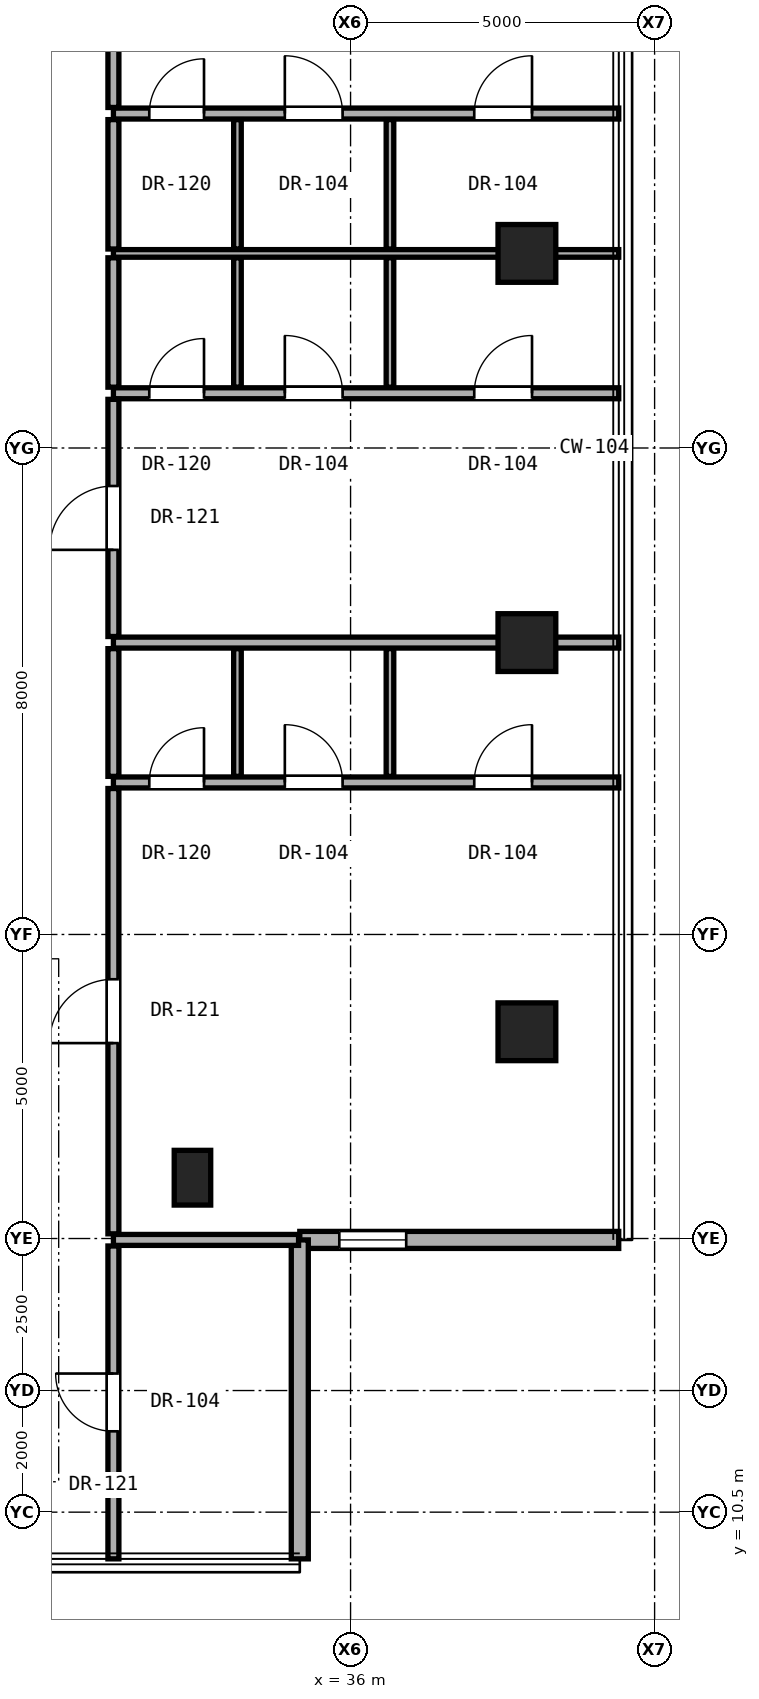
"""IFC4 building model, lengths in metres.
Left out: names, types, materials, properties, quantities, classifications, styles, units other than length and angle.
Written with IfcOpenShell. Run it as: python <this file> out.ifc"""

import sys

from ifc_helpers import new_model, si_unit, direction, frame, frame_2d, origin, origin_2d, place, context, subcontext, project, spatial, rectangle, hollow_rectangle, extrude, element, fill, save


model = new_model("IFC4")
c1 = context("Model", 3, precision=1e-05, world=origin(), true_north=direction((0.0, 1.0)))
c2 = subcontext(c1, "Body", "Model", "MODEL_VIEW")
j1 = project(units=[si_unit("LENGTHUNIT", "METRE"), si_unit("PLANEANGLEUNIT", "RADIAN")], contexts=[c1])
p1 = place(None, origin())
s1 = spatial("IfcSite", under=j1, at=p1, CompositionType="ELEMENT")
p2 = place(p1, origin())
s2 = spatial("IfcBuilding", under=s1, at=p2, CompositionType="ELEMENT")
p3 = place(p2, frame((0.0, 0.0, 157.65)))
s3 = spatial("IfcBuildingStorey", under=s2, at=p3, CompositionType="ELEMENT", Elevation=157.65)
for number, where, z_axis, x_axis in (
    (1, (38.9, 18.4, 0.0), (0.0, 0.0, 1.0), (1.0, 0.0, 0.0)),
    (2, (38.9, 24.8, 0.0), (0.0, 0.0, 1.0), (1.0, 0.0, 0.0)),
    (3, (38.9, 31.2, 0.0), (0.0, 0.0, 1.0), (1.0, 0.0, 0.0)),
):
    element("IfcColumn", number, at=place(p3, frame(where, z_axis=z_axis, x_axis=x_axis)), inside=s3, PredefinedType="COLUMN", context=c2, shape_type="SweptSolid", body=[
        extrude(hollow_rectangle(XDim=0.95, YDim=0.95, WallThickness=0.05, at=origin_2d()), origin(), (0.0, 0.0, 1.0), 3.25),
    ])
p4 = place(p3, frame((33.4, 16.0, 0.0), z_axis=(0.0, 0.0, 1.0), x_axis=(1.0, 0.0, 0.0)))
e4 = element("IfcColumn", 4, at=p4, inside=s3, PredefinedType="PILASTER", context=c2, shape_type="SweptSolid", body=[
    extrude(rectangle(XDim=0.6, YDim=0.9, at=origin_2d()), origin(), (0.0, 0.0, 1.0), 3.25),
])
p5 = place(p3, frame((35.165, 14.977, 0.0), z_axis=(0.0, 0.0, 1.0), x_axis=(1.0, 0.0, 0.0)))
e5 = element("IfcWall", 5, at=p5, inside=s3, PredefinedType="SOLIDWALL", context=c2, shape_type="SweptSolid", body=[
    extrude(rectangle(XDim=5.245, YDim=0.28, at=frame_2d((2.623, 0.0))), origin(), (0.0, 0.0, 1.0), 3.03),
])
p6 = place(p5, frame((0.65, 0.0, 0.85)))
e6 = element("IfcOpeningElement", 6, at=p6, cuts=e5, PredefinedType="OPENING", context=c2, shape_type="SweptSolid", body=[
    extrude(rectangle(XDim=1.1, YDim=2.0, at=frame_2d((0.55, 1.0))), frame((0.0, 0.15, 0.0), z_axis=(0.0, -1.0, 0.0), x_axis=(1.0, 0.0, 0.0)), (0.0, 0.0, 1.0), 0.3),
])
p7 = place(p3, frame((35.165, 9.732, 0.0), z_axis=(0.0, 0.0, 1.0), x_axis=(0.0, 1.0, 0.0)))
e7 = element("IfcWall", 7, at=p7, inside=s3, PredefinedType="SOLIDWALL", context=c2, shape_type="SweptSolid", body=[
    extrude(rectangle(XDim=5.245, YDim=0.28, at=frame_2d((2.623, 0.0))), origin(), (0.0, 0.0, 1.0), 3.03),
])
p8 = place(p3, frame((32.1, 14.977, 0.0), z_axis=(0.0, 0.0, 1.0), x_axis=(1.0, 0.0, 0.0)))
e8 = element("IfcWall", 8, at=p8, inside=s3, PredefinedType="PARTITIONING", context=c2, shape_type="SweptSolid", body=[
    extrude(rectangle(XDim=3.045, YDim=0.18, at=frame_2d((1.522, 0.0))), origin(), (0.0, 0.0, 1.0), 3.05),
])
p9 = place(p3, frame((32.1, 22.5, 0.0), z_axis=(0.0, 0.0, 1.0), x_axis=(1.0, 0.0, 0.0)))
e9 = element("IfcWall", 9, at=p9, inside=s3, PredefinedType="PARTITIONING", context=c2, shape_type="SweptSolid", body=[
    extrude(rectangle(XDim=8.31, YDim=0.18, at=frame_2d((4.155, 0.0))), origin(), (0.0, 0.0, 1.0), 2.269),
])
p10 = place(p9, frame((5.934, 0.0, 0.0)))
e10 = element("IfcOpeningElement", 10, at=p10, cuts=e9, PredefinedType="OPENING", context=c2, shape_type="SweptSolid", body=[
    extrude(rectangle(XDim=0.95, YDim=2.15, at=frame_2d((0.475, 1.075))), frame((0.0, 0.1, 0.0), z_axis=(0.0, -1.0, 0.0), x_axis=(1.0, 0.0, 0.0)), (0.0, 0.0, 1.0), 0.2),
])
p11 = place(p9, frame((2.819, 0.0, 0.0)))
e11 = element("IfcOpeningElement", 11, at=p11, cuts=e9, PredefinedType="OPENING", context=c2, shape_type="SweptSolid", body=[
    extrude(rectangle(XDim=0.95, YDim=2.15, at=frame_2d((0.475, 1.075))), frame((0.0, 0.1, 0.0), z_axis=(0.0, -1.0, 0.0), x_axis=(1.0, 0.0, 0.0)), (0.0, 0.0, 1.0), 0.2),
])
p12 = place(p9, frame((0.59, 0.0, 0.0)))
e12 = element("IfcOpeningElement", 12, at=p12, cuts=e9, PredefinedType="OPENING", context=c2, shape_type="SweptSolid", body=[
    extrude(rectangle(XDim=0.9, YDim=2.1, at=frame_2d((0.45, 1.05))), frame((0.0, 0.1, 0.0), z_axis=(0.0, -1.0, 0.0), x_axis=(1.0, 0.0, 0.0)), (0.0, 0.0, 1.0), 0.2),
])
p13 = place(p3, frame((32.1, 24.8, 0.0), z_axis=(0.0, 0.0, 1.0), x_axis=(1.0, 0.0, 0.0)))
e13 = element("IfcWall", 13, at=p13, inside=s3, PredefinedType="PARTITIONING", context=c2, shape_type="SweptSolid", body=[
    extrude(rectangle(XDim=8.31, YDim=0.18, at=frame_2d((4.155, 0.0))), origin(), (0.0, 0.0, 1.0), 2.269),
])
p14 = place(p3, frame((32.1, 28.9, 0.0), z_axis=(0.0, 0.0, 1.0), x_axis=(1.0, 0.0, 0.0)))
e14 = element("IfcWall", 14, at=p14, inside=s3, PredefinedType="PARTITIONING", context=c2, shape_type="SweptSolid", body=[
    extrude(rectangle(XDim=8.31, YDim=0.18, at=frame_2d((4.155, 0.0))), origin(), (0.0, 0.0, 1.0), 2.269),
])
p15 = place(p14, frame((5.934, 0.0, 0.0)))
e15 = element("IfcOpeningElement", 15, at=p15, cuts=e14, PredefinedType="OPENING", context=c2, shape_type="SweptSolid", body=[
    extrude(rectangle(XDim=0.95, YDim=2.15, at=frame_2d((0.475, 1.075))), frame((0.0, 0.1, 0.0), z_axis=(0.0, -1.0, 0.0), x_axis=(1.0, 0.0, 0.0)), (0.0, 0.0, 1.0), 0.2),
])
p16 = place(p14, frame((2.819, 0.0, 0.0)))
e16 = element("IfcOpeningElement", 16, at=p16, cuts=e14, PredefinedType="OPENING", context=c2, shape_type="SweptSolid", body=[
    extrude(rectangle(XDim=0.95, YDim=2.15, at=frame_2d((0.475, 1.075))), frame((0.0, 0.1, 0.0), z_axis=(0.0, -1.0, 0.0), x_axis=(1.0, 0.0, 0.0)), (0.0, 0.0, 1.0), 0.2),
])
p17 = place(p14, frame((0.59, 0.0, 0.0)))
e17 = element("IfcOpeningElement", 17, at=p17, cuts=e14, PredefinedType="OPENING", context=c2, shape_type="SweptSolid", body=[
    extrude(rectangle(XDim=0.9, YDim=2.1, at=frame_2d((0.45, 1.05))), frame((0.0, 0.1, 0.0), z_axis=(0.0, -1.0, 0.0), x_axis=(1.0, 0.0, 0.0)), (0.0, 0.0, 1.0), 0.2),
])
p18 = place(p3, frame((32.1, 31.2, 0.0), z_axis=(0.0, 0.0, 1.0), x_axis=(1.0, 0.0, 0.0)))
e18 = element("IfcWall", 18, at=p18, inside=s3, PredefinedType="PARTITIONING", context=c2, shape_type="SweptSolid", body=[
    extrude(rectangle(XDim=8.31, YDim=0.125, at=frame_2d((4.155, 0.0))), origin(), (0.0, 0.0, 1.0), 2.269),
])
p19 = place(p3, frame((32.1, 33.5, 0.0), z_axis=(0.0, 0.0, 1.0), x_axis=(1.0, 0.0, 0.0)))
e19 = element("IfcWall", 19, at=p19, inside=s3, PredefinedType="PARTITIONING", context=c2, shape_type="SweptSolid", body=[
    extrude(rectangle(XDim=8.31, YDim=0.18, at=frame_2d((4.155, 0.0))), origin(), (0.0, 0.0, 1.0), 2.269),
])
p20 = place(p19, frame((5.934, 0.0, 0.0)))
e20 = element("IfcOpeningElement", 20, at=p20, cuts=e19, PredefinedType="OPENING", context=c2, shape_type="SweptSolid", body=[
    extrude(rectangle(XDim=0.95, YDim=2.15, at=frame_2d((0.475, 1.075))), frame((0.0, 0.1, 0.0), z_axis=(0.0, -1.0, 0.0), x_axis=(1.0, 0.0, 0.0)), (0.0, 0.0, 1.0), 0.2),
])
p21 = place(p19, frame((2.819, 0.0, 0.0)))
e21 = element("IfcOpeningElement", 21, at=p21, cuts=e19, PredefinedType="OPENING", context=c2, shape_type="SweptSolid", body=[
    extrude(rectangle(XDim=0.95, YDim=2.15, at=frame_2d((0.475, 1.075))), frame((0.0, 0.1, 0.0), z_axis=(0.0, -1.0, 0.0), x_axis=(1.0, 0.0, 0.0)), (0.0, 0.0, 1.0), 0.2),
])
p22 = place(p19, frame((0.59, 0.0, 0.0)))
e22 = element("IfcOpeningElement", 22, at=p22, cuts=e19, PredefinedType="OPENING", context=c2, shape_type="SweptSolid", body=[
    extrude(rectangle(XDim=0.9, YDim=2.1, at=frame_2d((0.45, 1.05))), frame((0.0, 0.1, 0.0), z_axis=(0.0, -1.0, 0.0), x_axis=(1.0, 0.0, 0.0)), (0.0, 0.0, 1.0), 0.2),
])
p23 = place(p3, frame((32.1, 9.732, 0.0), z_axis=(0.0, 0.0, 1.0), x_axis=(0.0, 1.0, 0.0)))
e23 = element("IfcWall", 23, at=p23, inside=s3, PredefinedType="PARTITIONING", context=c2, shape_type="SweptSolid", body=[
    extrude(rectangle(XDim=5.145, YDim=0.18, at=frame_2d((2.573, 0.0))), origin(), (0.0, 0.0, 1.0), 3.05),
])
p24 = place(p23, frame((2.097, 0.0, 0.0)))
e24 = element("IfcOpeningElement", 24, at=p24, cuts=e23, PredefinedType="OPENING", context=c2, shape_type="SweptSolid", body=[
    extrude(rectangle(XDim=0.95, YDim=2.15, at=frame_2d((0.475, 1.075))), frame((0.0, 0.1, 0.0), z_axis=(0.0, -1.0, 0.0), x_axis=(1.0, 0.0, 0.0)), (0.0, 0.0, 1.0), 0.2),
])
p25 = place(p3, frame((32.1, 15.077, 0.0), z_axis=(0.0, 0.0, 1.0), x_axis=(0.0, 1.0, 0.0)))
e25 = element("IfcWall", 25, at=p25, inside=s3, PredefinedType="PARTITIONING", context=c2, shape_type="SweptSolid", body=[
    extrude(rectangle(XDim=7.323, YDim=0.18, at=frame_2d((3.662, 0.0))), origin(), (0.0, 0.0, 1.0), 2.442),
])
p26 = place(p25, frame((3.136, 0.0, 0.0)))
e26 = element("IfcOpeningElement", 26, at=p26, cuts=e25, PredefinedType="OPENING", context=c2, shape_type="SweptSolid", body=[
    extrude(rectangle(XDim=1.05, YDim=2.2, at=frame_2d((0.525, 1.1))), frame((0.0, 0.1, 0.0), z_axis=(0.0, -1.0, 0.0), x_axis=(1.0, 0.0, 0.0)), (0.0, 0.0, 1.0), 0.2),
])
p27 = place(p3, frame((32.1, 22.6, 0.0), z_axis=(0.0, 0.0, 1.0), x_axis=(0.0, 1.0, 0.0)))
e27 = element("IfcWall", 27, at=p27, inside=s3, PredefinedType="PARTITIONING", context=c2, shape_type="SweptSolid", body=[
    extrude(rectangle(XDim=2.1, YDim=0.18, at=frame_2d((1.05, 0.0))), origin(), (0.0, 0.0, 1.0), 2.346),
])
p28 = place(p3, frame((32.1, 24.9, 0.0), z_axis=(0.0, 0.0, 1.0), x_axis=(0.0, 1.0, 0.0)))
e28 = element("IfcWall", 28, at=p28, inside=s3, PredefinedType="PARTITIONING", context=c2, shape_type="SweptSolid", body=[
    extrude(rectangle(XDim=3.9, YDim=0.18, at=frame_2d((1.95, 0.0))), origin(), (0.0, 0.0, 1.0), 2.346),
])
p29 = place(p28, frame((1.425, 0.0, 0.0)))
e29 = element("IfcOpeningElement", 29, at=p29, cuts=e28, PredefinedType="OPENING", context=c2, shape_type="SweptSolid", body=[
    extrude(rectangle(XDim=1.05, YDim=2.2, at=frame_2d((0.525, 1.1))), frame((0.0, 0.1, 0.0), z_axis=(0.0, -1.0, 0.0), x_axis=(1.0, 0.0, 0.0)), (0.0, 0.0, 1.0), 0.2),
])
for number, where, z_axis, x_axis in (
    (30, (32.1, 29.0, 0.0), (0.0, 0.0, 1.0), (0.0, 1.0, 0.0)),
    (31, (32.1, 31.272, 0.0), (0.0, 0.0, 1.0), (0.0, 1.0, 0.0)),
):
    element("IfcWall", number, at=place(p3, frame(where, z_axis=z_axis, x_axis=x_axis)), inside=s3, PredefinedType="PARTITIONING", context=c2, shape_type="SweptSolid", body=[
        extrude(rectangle(XDim=2.127, YDim=0.18, at=frame_2d((1.064, 0.0))), origin(), (0.0, 0.0, 1.0), 2.346),
    ])
p30 = place(p3, frame((32.1, 33.6, 0.0), z_axis=(0.0, 0.0, 1.0), x_axis=(0.0, 1.0, 0.0)))
e32 = element("IfcWall", 32, at=p30, inside=s3, PredefinedType="PARTITIONING", context=c2, shape_type="SweptSolid", body=[
    extrude(rectangle(XDim=7.323, YDim=0.18, at=frame_2d((3.662, 0.0))), origin(), (0.0, 0.0, 1.0), 2.442),
])
p31 = place(p30, frame((3.136, 0.0, 0.0)))
e33 = element("IfcOpeningElement", 33, at=p31, cuts=e32, PredefinedType="OPENING", context=c2, shape_type="SweptSolid", body=[
    extrude(rectangle(XDim=1.05, YDim=2.2, at=frame_2d((0.525, 1.1))), frame((0.0, 0.1, 0.0), z_axis=(0.0, -1.0, 0.0), x_axis=(1.0, 0.0, 0.0)), (0.0, 0.0, 1.0), 0.2),
])
p32 = place(p3, frame((34.14, 22.6, 0.0), z_axis=(0.0, 0.0, 1.0), x_axis=(0.0, 1.0, 0.0)))
e34 = element("IfcWall", 34, at=p32, inside=s3, PredefinedType="PARTITIONING", context=c2, shape_type="SweptSolid", body=[
    extrude(rectangle(XDim=2.1, YDim=0.125, at=frame_2d((1.05, 0.0))), origin(), (0.0, 0.0, 1.0), 2.346),
])
for number, where, z_axis, x_axis in (
    (35, (34.14, 29.0, 0.0), (0.0, 0.0, 1.0), (0.0, 1.0, 0.0)),
    (36, (34.14, 31.272, 0.0), (0.0, 0.0, 1.0), (0.0, 1.0, 0.0)),
):
    element("IfcWall", number, at=place(p3, frame(where, z_axis=z_axis, x_axis=x_axis)), inside=s3, PredefinedType="PARTITIONING", context=c2, shape_type="SweptSolid", body=[
        extrude(rectangle(XDim=2.127, YDim=0.125, at=frame_2d((1.064, 0.0))), origin(), (0.0, 0.0, 1.0), 2.346),
    ])
p33 = place(p3, frame((36.648, 22.6, 0.0), z_axis=(0.0, 0.0, 1.0), x_axis=(0.0, 1.0, 0.0)))
e37 = element("IfcWall", 37, at=p33, inside=s3, PredefinedType="PARTITIONING", context=c2, shape_type="SweptSolid", body=[
    extrude(rectangle(XDim=2.1, YDim=0.125, at=frame_2d((1.05, 0.0))), origin(), (0.0, 0.0, 1.0), 2.346),
])
for number, where, z_axis, x_axis in (
    (38, (36.648, 29.0, 0.0), (0.0, 0.0, 1.0), (0.0, 1.0, 0.0)),
    (39, (36.648, 31.272, 0.0), (0.0, 0.0, 1.0), (0.0, 1.0, 0.0)),
):
    element("IfcWall", number, at=place(p3, frame(where, z_axis=z_axis, x_axis=x_axis)), inside=s3, PredefinedType="PARTITIONING", context=c2, shape_type="SweptSolid", body=[
        extrude(rectangle(XDim=2.127, YDim=0.125, at=frame_2d((1.064, 0.0))), origin(), (0.0, 0.0, 1.0), 2.346),
    ])
p34 = place(p6, origin())
e40 = element("IfcWindow", 40, at=p34, inside=s3, PartitioningType="SINGLE_PANEL", PredefinedType="WINDOW", context=c2, shape_type="SweptSolid", body=[
    extrude(rectangle(XDim=1.1, YDim=2.0, at=frame_2d((0.55, 1.0))), frame((0.0, 0.03, 0.0), z_axis=(0.0, -1.0, 0.0), x_axis=(1.0, 0.0, 0.0)), (0.0, 0.0, 1.0), 0.06),
])
fill(e6, e40)
p35 = place(p26, origin())
e41 = element("IfcDoor", 41, at=p35, inside=s3, OperationType="SINGLE_SWING_LEFT", PredefinedType="DOOR", context=c2, shape_type="SweptSolid", body=[
    extrude(rectangle(XDim=1.05, YDim=2.2, at=frame_2d((0.525, 1.1))), frame((0.0, 0.025, 0.0), z_axis=(0.0, -1.0, 0.0), x_axis=(1.0, 0.0, 0.0)), (0.0, 0.0, 1.0), 0.05),
])
fill(e26, e41)
p36 = place(p10, origin())
e42 = element("IfcDoor", 42, at=p36, inside=s3, OperationType="SINGLE_SWING_RIGHT", PredefinedType="DOOR", context=c2, shape_type="SweptSolid", body=[
    extrude(rectangle(XDim=0.95, YDim=2.15, at=frame_2d((0.475, 1.075))), frame((0.0, 0.025, 0.0), z_axis=(0.0, -1.0, 0.0), x_axis=(1.0, 0.0, 0.0)), (0.0, 0.0, 1.0), 0.05),
])
fill(e10, e42)
p37 = place(p11, origin())
e43 = element("IfcDoor", 43, at=p37, inside=s3, OperationType="SINGLE_SWING_LEFT", PredefinedType="DOOR", context=c2, shape_type="SweptSolid", body=[
    extrude(rectangle(XDim=0.95, YDim=2.15, at=frame_2d((0.475, 1.075))), frame((0.0, 0.025, 0.0), z_axis=(0.0, -1.0, 0.0), x_axis=(1.0, 0.0, 0.0)), (0.0, 0.0, 1.0), 0.05),
])
fill(e11, e43)
p38 = place(p12, origin())
e44 = element("IfcDoor", 44, at=p38, inside=s3, OperationType="SINGLE_SWING_RIGHT", PredefinedType="DOOR", context=c2, shape_type="SweptSolid", body=[
    extrude(rectangle(XDim=0.9, YDim=2.1, at=frame_2d((0.45, 1.05))), frame((0.0, 0.025, 0.0), z_axis=(0.0, -1.0, 0.0), x_axis=(1.0, 0.0, 0.0)), (0.0, 0.0, 1.0), 0.05),
])
fill(e12, e44)
p39 = place(p29, origin())
e45 = element("IfcDoor", 45, at=p39, inside=s3, OperationType="SINGLE_SWING_LEFT", PredefinedType="DOOR", context=c2, shape_type="SweptSolid", body=[
    extrude(rectangle(XDim=1.05, YDim=2.2, at=frame_2d((0.525, 1.1))), frame((0.0, 0.025, 0.0), z_axis=(0.0, -1.0, 0.0), x_axis=(1.0, 0.0, 0.0)), (0.0, 0.0, 1.0), 0.05),
])
fill(e29, e45)
p40 = place(p15, origin())
e46 = element("IfcDoor", 46, at=p40, inside=s3, OperationType="SINGLE_SWING_RIGHT", PredefinedType="DOOR", context=c2, shape_type="SweptSolid", body=[
    extrude(rectangle(XDim=0.95, YDim=2.15, at=frame_2d((0.475, 1.075))), frame((0.0, 0.025, 0.0), z_axis=(0.0, -1.0, 0.0), x_axis=(1.0, 0.0, 0.0)), (0.0, 0.0, 1.0), 0.05),
])
fill(e15, e46)
p41 = place(p16, origin())
e47 = element("IfcDoor", 47, at=p41, inside=s3, OperationType="SINGLE_SWING_LEFT", PredefinedType="DOOR", context=c2, shape_type="SweptSolid", body=[
    extrude(rectangle(XDim=0.95, YDim=2.15, at=frame_2d((0.475, 1.075))), frame((0.0, 0.025, 0.0), z_axis=(0.0, -1.0, 0.0), x_axis=(1.0, 0.0, 0.0)), (0.0, 0.0, 1.0), 0.05),
])
fill(e16, e47)
p42 = place(p17, origin())
e48 = element("IfcDoor", 48, at=p42, inside=s3, OperationType="SINGLE_SWING_RIGHT", PredefinedType="DOOR", context=c2, shape_type="SweptSolid", body=[
    extrude(rectangle(XDim=0.9, YDim=2.1, at=frame_2d((0.45, 1.05))), frame((0.0, 0.025, 0.0), z_axis=(0.0, -1.0, 0.0), x_axis=(1.0, 0.0, 0.0)), (0.0, 0.0, 1.0), 0.05),
])
fill(e17, e48)
p43 = place(p20, origin())
e49 = element("IfcDoor", 49, at=p43, inside=s3, OperationType="SINGLE_SWING_RIGHT", PredefinedType="DOOR", context=c2, shape_type="SweptSolid", body=[
    extrude(rectangle(XDim=0.95, YDim=2.15, at=frame_2d((0.475, 1.075))), frame((0.0, 0.025, 0.0), z_axis=(0.0, -1.0, 0.0), x_axis=(1.0, 0.0, 0.0)), (0.0, 0.0, 1.0), 0.05),
])
fill(e20, e49)
p44 = place(p21, origin())
e50 = element("IfcDoor", 50, at=p44, inside=s3, OperationType="SINGLE_SWING_LEFT", PredefinedType="DOOR", context=c2, shape_type="SweptSolid", body=[
    extrude(rectangle(XDim=0.95, YDim=2.15, at=frame_2d((0.475, 1.075))), frame((0.0, 0.025, 0.0), z_axis=(0.0, -1.0, 0.0), x_axis=(1.0, 0.0, 0.0)), (0.0, 0.0, 1.0), 0.05),
])
fill(e21, e50)
p45 = place(p22, origin())
e51 = element("IfcDoor", 51, at=p45, inside=s3, OperationType="SINGLE_SWING_RIGHT", PredefinedType="DOOR", context=c2, shape_type="SweptSolid", body=[
    extrude(rectangle(XDim=0.9, YDim=2.1, at=frame_2d((0.45, 1.05))), frame((0.0, 0.025, 0.0), z_axis=(0.0, -1.0, 0.0), x_axis=(1.0, 0.0, 0.0)), (0.0, 0.0, 1.0), 0.05),
])
fill(e22, e51)
p46 = place(p24, origin())
e52 = element("IfcDoor", 52, at=p46, inside=s3, OperationType="SINGLE_SWING_RIGHT", PredefinedType="DOOR", context=c2, shape_type="SweptSolid", body=[
    extrude(rectangle(XDim=0.95, YDim=2.15, at=frame_2d((0.475, 1.075))), frame((0.0, 0.025, 0.0), z_axis=(0.0, -1.0, 0.0), x_axis=(1.0, 0.0, 0.0)), (0.0, 0.0, 1.0), 0.05),
])
fill(e24, e52)
save(model, sys.argv[1])
